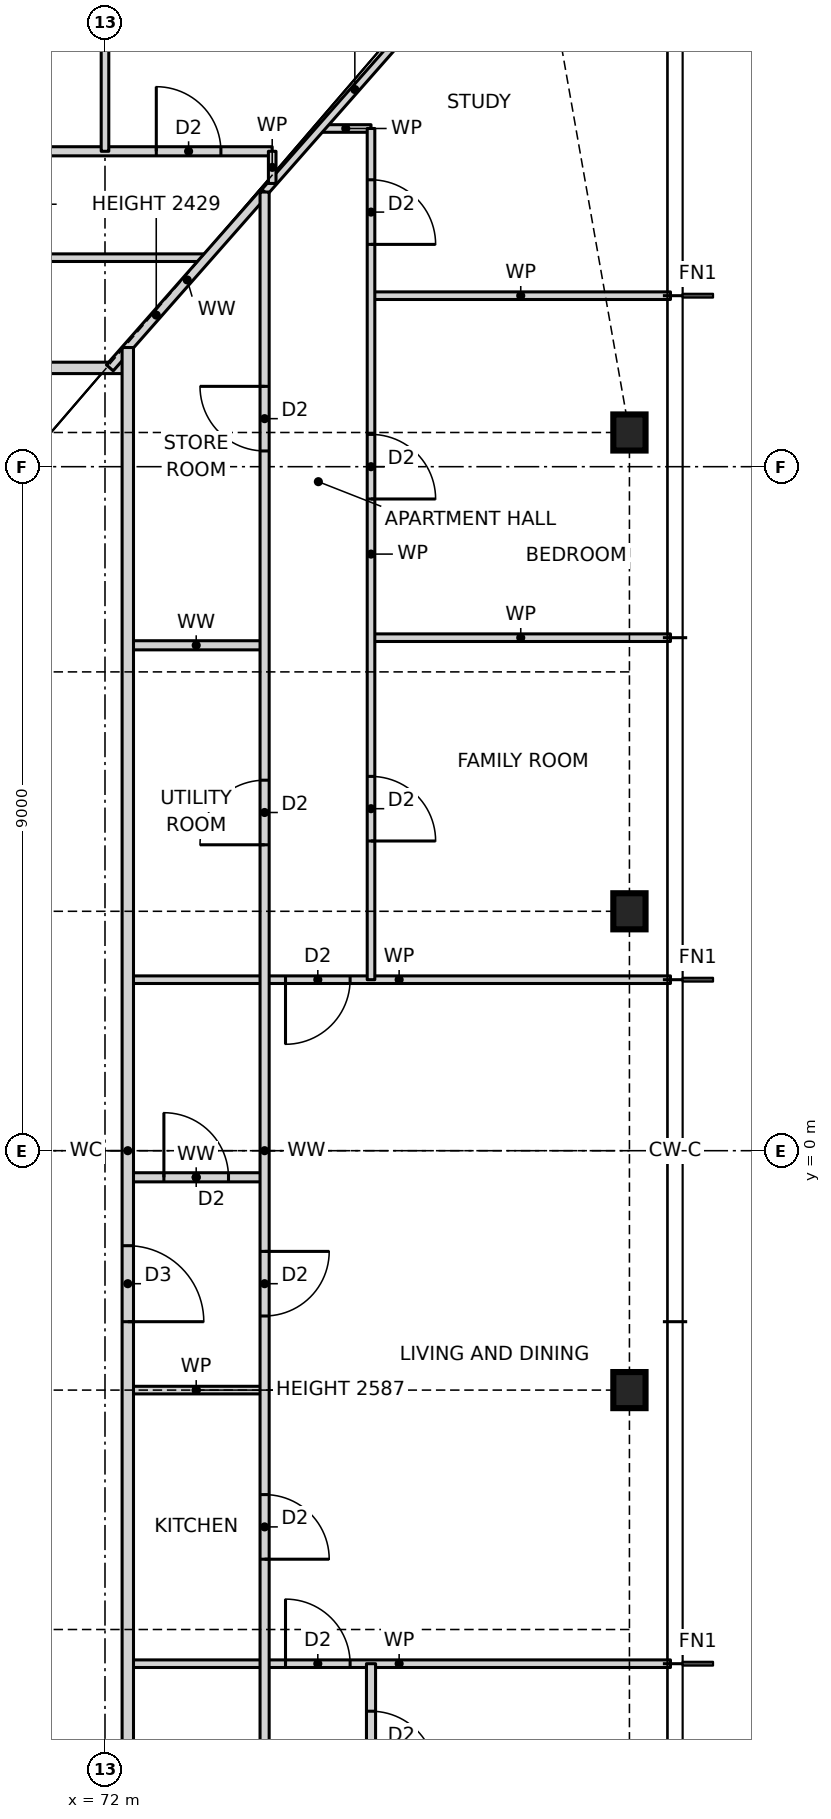
"""IFC4 building model, lengths in metres.
Left out: names, types, materials, properties, quantities, classifications, styles, units other than length and angle.
Written with IfcOpenShell. Run it as: python <this file> out.ifc"""

import sys

from ifc_helpers import new_model, si_unit, direction, frame, frame_2d, origin, origin_2d, place, context, subcontext, project, spatial, rectangle, i_section, extrude, element, fill, save


model = new_model("IFC4")
c1 = context("Model", 3, precision=1e-05, world=origin(), true_north=direction((0.0, 1.0)))
c2 = subcontext(c1, "Body", "Model", "MODEL_VIEW")
j1 = project(units=[si_unit("LENGTHUNIT", "METRE"), si_unit("PLANEANGLEUNIT", "RADIAN")], contexts=[c1])
p1 = place(None, origin())
s1 = spatial("IfcSite", under=j1, at=p1, CompositionType="ELEMENT")
p2 = place(p1, origin())
s2 = spatial("IfcBuilding", under=s1, at=p2, CompositionType="ELEMENT")
p3 = place(p2, frame((0.0, 0.0, 29.0)))
s3 = spatial("IfcBuildingStorey", under=s2, at=p3, CompositionType="ELEMENT", Elevation=29.0)
for number, where, z_axis, x_axis in (
    (1, (78.9, -3.15, 0.0), (0.0, 0.0, 1.0), (1.0, 0.0, 0.0)),
    (2, (78.9, 3.15, 0.0), (0.0, 0.0, 1.0), (1.0, 0.0, 0.0)),
    (3, (78.9, 9.45, 0.0), (0.0, 0.0, 1.0), (1.0, 0.0, 0.0)),
):
    element("IfcColumn", number, at=place(p3, frame(where, z_axis=z_axis, x_axis=x_axis)), inside=s3, PredefinedType="COLUMN", context=c2, shape_type="SweptSolid", body=[
        extrude(i_section(OverallWidth=0.424, OverallDepth=0.475, WebThickness=0.048, FlangeThickness=0.077, at=origin_2d()), origin(), (0.0, 0.0, 1.0), 3.5),
    ])
p4 = place(p3, frame((72.3, -6.75, 0.0), z_axis=(0.0, 0.0, 1.0), x_axis=(1.0, 0.0, 0.0)))
e4 = element("IfcWall", 4, at=p4, inside=s3, PredefinedType="PARTITIONING", context=c2, shape_type="SweptSolid", body=[
    extrude(rectangle(XDim=7.14, YDim=0.1, at=frame_2d((3.57, 0.0))), origin(), (0.0, 0.0, 1.0), 3.27),
])
p5 = place(p4, frame((2.075, 0.0, 0.0)))
e5 = element("IfcOpeningElement", 5, at=p5, cuts=e4, PredefinedType="OPENING", context=c2, shape_type="SweptSolid", body=[
    extrude(rectangle(XDim=0.85, YDim=2.1, at=frame_2d((0.425, 1.05))), frame((0.0, 0.06, 0.0), z_axis=(0.0, -1.0, 0.0), x_axis=(1.0, 0.0, 0.0)), (0.0, 0.0, 1.0), 0.12),
])
p6 = place(p3, frame((72.3, -3.15, 0.0), z_axis=(0.0, 0.0, 1.0), x_axis=(1.0, 0.0, 0.0)))
e6 = element("IfcWall", 6, at=p6, inside=s3, PredefinedType="PARTITIONING", context=c2, shape_type="SweptSolid", body=[
    extrude(rectangle(XDim=1.8, YDim=0.1, at=frame_2d((0.9, 0.0))), origin(), (0.0, 0.0, 1.0), 2.587),
])
p7 = place(p3, frame((72.3, -0.35, 0.0), z_axis=(0.0, 0.0, 1.0), x_axis=(1.0, 0.0, 0.0)))
e7 = element("IfcWall", 7, at=p7, inside=s3, PredefinedType="PARTITIONING", context=c2, shape_type="SweptSolid", body=[
    extrude(rectangle(XDim=1.8, YDim=0.12, at=frame_2d((0.9, 0.0))), origin(), (0.0, 0.0, 1.0), 3.27),
])
p8 = place(p7, frame((0.475, 0.0, 0.0)))
e8 = element("IfcOpeningElement", 8, at=p8, cuts=e7, PredefinedType="OPENING", context=c2, shape_type="SweptSolid", body=[
    extrude(rectangle(XDim=0.85, YDim=2.1, at=frame_2d((0.425, 1.05))), frame((0.0, 0.07, 0.0), z_axis=(0.0, -1.0, 0.0), x_axis=(1.0, 0.0, 0.0)), (0.0, 0.0, 1.0), 0.14),
])
p9 = place(p3, frame((72.3, 2.25, 0.0), z_axis=(0.0, 0.0, 1.0), x_axis=(1.0, 0.0, 0.0)))
e9 = element("IfcWall", 9, at=p9, inside=s3, PredefinedType="PARTITIONING", context=c2, shape_type="SweptSolid", body=[
    extrude(rectangle(XDim=7.14, YDim=0.1, at=frame_2d((3.57, 0.0))), origin(), (0.0, 0.0, 1.0), 3.27),
])
p10 = place(p9, frame((2.075, 0.0, 0.0)))
e10 = element("IfcOpeningElement", 10, at=p10, cuts=e9, PredefinedType="OPENING", context=c2, shape_type="SweptSolid", body=[
    extrude(rectangle(XDim=0.85, YDim=2.1, at=frame_2d((0.425, 1.05))), frame((0.0, 0.06, 0.0), z_axis=(0.0, -1.0, 0.0), x_axis=(1.0, 0.0, 0.0)), (0.0, 0.0, 1.0), 0.12),
])
p11 = place(p3, frame((72.3, 6.65, 0.0), z_axis=(0.0, 0.0, 1.0), x_axis=(1.0, 0.0, 0.0)))
e11 = element("IfcWall", 11, at=p11, inside=s3, PredefinedType="PARTITIONING", context=c2, shape_type="SweptSolid", body=[
    extrude(rectangle(XDim=1.8, YDim=0.12, at=frame_2d((0.9, 0.0))), origin(), (0.0, 0.0, 1.0), 3.27),
])
p12 = place(p3, frame((75.5, 6.75, 0.0), z_axis=(0.0, 0.0, 1.0), x_axis=(1.0, 0.0, 0.0)))
e12 = element("IfcWall", 12, at=p12, inside=s3, PredefinedType="PARTITIONING", context=c2, shape_type="SweptSolid", body=[
    extrude(rectangle(XDim=3.94, YDim=0.1, at=frame_2d((1.97, 0.0))), origin(), (0.0, 0.0, 1.0), 3.27),
])
p13 = place(p3, frame((53.7, 10.3, 0.0), z_axis=(0.0, 0.0, 1.0), x_axis=(1.0, 0.0, 0.0)))
e13 = element("IfcWall", 13, at=p13, inside=s3, PredefinedType="PARTITIONING", context=c2, shape_type="SweptSolid", body=[
    extrude(rectangle(XDim=18.6, YDim=0.15, at=frame_2d((9.3, 0.0))), origin(), (0.0, 0.0, 1.0), 3.27),
])
p14 = place(p13, frame((8.3, 0.0, 0.0)))
e14 = element("IfcOpeningElement", 14, at=p14, cuts=e13, PredefinedType="OPENING", context=c2, shape_type="SweptSolid", body=[
    extrude(rectangle(XDim=1.0, YDim=2.1, at=frame_2d((0.5, 1.05))), frame((0.0, 0.085, 0.0), z_axis=(0.0, -1.0, 0.0), x_axis=(1.0, 0.0, 0.0)), (0.0, 0.0, 1.0), 0.17),
])
p15 = place(p3, frame((75.5, 11.25, 0.0), z_axis=(0.0, 0.0, 1.0), x_axis=(1.0, 0.0, 0.0)))
e15 = element("IfcWall", 15, at=p15, inside=s3, PredefinedType="PARTITIONING", context=c2, shape_type="SweptSolid", body=[
    extrude(rectangle(XDim=3.94, YDim=0.1, at=frame_2d((1.97, 0.0))), origin(), (0.0, 0.0, 1.0), 3.27),
])
p16 = place(p3, frame((52.66, 11.75, 0.0), z_axis=(0.0, 0.0, 1.0), x_axis=(1.0, 0.0, 0.0)))
e16 = element("IfcWall", 16, at=p16, inside=s3, PredefinedType="PARTITIONING", context=c2, shape_type="SweptSolid", body=[
    extrude(rectangle(XDim=20.68, YDim=0.1, at=frame_2d((10.34, 0.0))), origin(), (0.0, 0.0, 1.0), 3.27),
])
p17 = place(p16, frame((12.615, 0.0, 0.0)))
e17 = element("IfcOpeningElement", 17, at=p17, cuts=e16, PredefinedType="OPENING", context=c2, shape_type="SweptSolid", body=[
    extrude(rectangle(XDim=0.85, YDim=2.1, at=frame_2d((0.425, 1.05))), frame((0.0, 0.06, 0.0), z_axis=(0.0, -1.0, 0.0), x_axis=(1.0, 0.0, 0.0)), (0.0, 0.0, 1.0), 0.12),
])
p18 = place(p16, frame((9.415, 0.0, 0.0)))
e18 = element("IfcOpeningElement", 18, at=p18, cuts=e16, PredefinedType="OPENING", context=c2, shape_type="SweptSolid", body=[
    extrude(rectangle(XDim=0.85, YDim=2.1, at=frame_2d((0.425, 1.05))), frame((0.0, 0.06, 0.0), z_axis=(0.0, -1.0, 0.0), x_axis=(1.0, 0.0, 0.0)), (0.0, 0.0, 1.0), 0.12),
])
p19 = place(p16, frame((17.335, 0.0, 0.0)))
e19 = element("IfcOpeningElement", 19, at=p19, cuts=e16, PredefinedType="OPENING", context=c2, shape_type="SweptSolid", body=[
    extrude(rectangle(XDim=0.85, YDim=2.1, at=frame_2d((0.425, 1.05))), frame((0.0, 0.06, 0.0), z_axis=(0.0, -1.0, 0.0), x_axis=(1.0, 0.0, 0.0)), (0.0, 0.0, 1.0), 0.12),
])
p20 = place(p16, frame((2.495, 0.0, 0.0)))
e20 = element("IfcOpeningElement", 20, at=p20, cuts=e16, PredefinedType="OPENING", context=c2, shape_type="SweptSolid", body=[
    extrude(rectangle(XDim=0.85, YDim=2.1, at=frame_2d((0.425, 1.05))), frame((0.0, 0.06, 0.0), z_axis=(0.0, -1.0, 0.0), x_axis=(1.0, 0.0, 0.0)), (0.0, 0.0, 1.0), 0.12),
])
p21 = place(p3, frame((67.5, 13.15, 0.0), z_axis=(0.0, 0.0, 1.0), x_axis=(1.0, 0.0, 0.0)))
e21 = element("IfcWall", 21, at=p21, inside=s3, PredefinedType="PARTITIONING", context=c2, shape_type="SweptSolid", body=[
    extrude(rectangle(XDim=6.7, YDim=0.12, at=frame_2d((3.35, 0.0))), origin(), (0.0, 0.0, 1.0), 3.27),
])
p22 = place(p21, frame((0.625, 0.0, 0.0)))
e22 = element("IfcOpeningElement", 22, at=p22, cuts=e21, PredefinedType="OPENING", context=c2, shape_type="SweptSolid", body=[
    extrude(rectangle(XDim=0.85, YDim=2.1, at=frame_2d((0.425, 1.05))), frame((0.0, 0.07, 0.0), z_axis=(0.0, -1.0, 0.0), x_axis=(1.0, 0.0, 0.0)), (0.0, 0.0, 1.0), 0.14),
])
p23 = place(p21, frame((5.175, 0.0, 0.0)))
e23 = element("IfcOpeningElement", 23, at=p23, cuts=e21, PredefinedType="OPENING", context=c2, shape_type="SweptSolid", body=[
    extrude(rectangle(XDim=0.85, YDim=2.1, at=frame_2d((0.425, 1.05))), frame((0.0, 0.07, 0.0), z_axis=(0.0, -1.0, 0.0), x_axis=(1.0, 0.0, 0.0)), (0.0, 0.0, 1.0), 0.14),
])
p24 = place(p3, frame((74.836, 13.45, 0.0), z_axis=(0.0, 0.0, 1.0), x_axis=(1.0, 0.0, 0.0)))
e24 = element("IfcWall", 24, at=p24, inside=s3, PredefinedType="PARTITIONING", context=c2, shape_type="SweptSolid", body=[
    extrude(rectangle(XDim=0.664, YDim=0.1, at=frame_2d((0.332, 0.0))), origin(), (0.0, 0.0, 1.0), 3.27),
])
p25 = place(p3, frame((74.1, 12.614, 0.0), z_axis=(0.0, 0.0, 1.0), x_axis=(0.660755619739, 0.750601099775, 0.0)))
e25 = element("IfcWall", 25, at=p25, inside=s3, PredefinedType="PARTITIONING", context=c2, shape_type="SweptSolid", body=[
    extrude(rectangle(XDim=5.989, YDim=0.1, at=frame_2d((2.995, 0.0))), origin(), (0.0, 0.0, 1.0), 2.429),
])
p26 = place(p3, frame((72.063, 10.301, 0.0), z_axis=(0.0, 0.0, 1.0), x_axis=(0.660761820138, 0.750595641506, 0.0)))
e26 = element("IfcWall", 26, at=p26, inside=s3, PredefinedType="PARTITIONING", context=c2, shape_type="SweptSolid", body=[
    extrude(rectangle(XDim=3.082, YDim=0.12, at=frame_2d((1.541, 0.0))), origin(), (0.0, 0.0, 1.0), 2.429),
])
p27 = place(p3, frame((75.5, -13.45, 0.0), z_axis=(0.0, 0.0, 1.0), x_axis=(0.0, 1.0, 0.0)))
e27 = element("IfcWall", 27, at=p27, inside=s3, PredefinedType="PARTITIONING", context=c2, shape_type="SweptSolid", body=[
    extrude(rectangle(XDim=6.7, YDim=0.12, at=frame_2d((3.35, 0.0))), origin(), (0.0, 0.0, 1.0), 3.27),
])
p28 = place(p27, frame((5.225, 0.0, 0.0)))
e28 = element("IfcOpeningElement", 28, at=p28, cuts=e27, PredefinedType="OPENING", context=c2, shape_type="SweptSolid", body=[
    extrude(rectangle(XDim=0.85, YDim=2.1, at=frame_2d((0.425, 1.05))), frame((0.0, 0.07, 0.0), z_axis=(0.0, -1.0, 0.0), x_axis=(1.0, 0.0, 0.0)), (0.0, 0.0, 1.0), 0.14),
])
p29 = place(p27, frame((0.675, 0.0, 0.0)))
e29 = element("IfcOpeningElement", 29, at=p29, cuts=e27, PredefinedType="OPENING", context=c2, shape_type="SweptSolid", body=[
    extrude(rectangle(XDim=0.85, YDim=2.1, at=frame_2d((0.425, 1.05))), frame((0.0, 0.07, 0.0), z_axis=(0.0, -1.0, 0.0), x_axis=(1.0, 0.0, 0.0)), (0.0, 0.0, 1.0), 0.14),
])
p30 = place(p3, frame((75.5, 2.25, 0.0), z_axis=(0.0, 0.0, 1.0), x_axis=(0.0, 1.0, 0.0)))
e30 = element("IfcWall", 30, at=p30, inside=s3, PredefinedType="PARTITIONING", context=c2, shape_type="SweptSolid", body=[
    extrude(rectangle(XDim=11.2, YDim=0.1, at=frame_2d((5.6, 0.0))), origin(), (0.0, 0.0, 1.0), 3.27),
])
p31 = place(p30, frame((1.825, 0.0, 0.0)))
e31 = element("IfcOpeningElement", 31, at=p31, cuts=e30, PredefinedType="OPENING", context=c2, shape_type="SweptSolid", body=[
    extrude(rectangle(XDim=0.85, YDim=2.1, at=frame_2d((0.425, 1.05))), frame((0.0, 0.06, 0.0), z_axis=(0.0, -1.0, 0.0), x_axis=(1.0, 0.0, 0.0)), (0.0, 0.0, 1.0), 0.12),
])
p32 = place(p30, frame((6.325, 0.0, 0.0)))
e32 = element("IfcOpeningElement", 32, at=p32, cuts=e30, PredefinedType="OPENING", context=c2, shape_type="SweptSolid", body=[
    extrude(rectangle(XDim=0.85, YDim=2.1, at=frame_2d((0.425, 1.05))), frame((0.0, 0.06, 0.0), z_axis=(0.0, -1.0, 0.0), x_axis=(1.0, 0.0, 0.0)), (0.0, 0.0, 1.0), 0.12),
])
p33 = place(p30, frame((9.675, 0.0, 0.0)))
e33 = element("IfcOpeningElement", 33, at=p33, cuts=e30, PredefinedType="OPENING", context=c2, shape_type="SweptSolid", body=[
    extrude(rectangle(XDim=0.85, YDim=2.1, at=frame_2d((0.425, 1.05))), frame((0.0, 0.06, 0.0), z_axis=(0.0, -1.0, 0.0), x_axis=(1.0, 0.0, 0.0)), (0.0, 0.0, 1.0), 0.12),
])
p34 = place(p3, frame((74.2, 12.727, 0.0), z_axis=(0.0, 0.0, 1.0), x_axis=(0.0, 1.0, 0.0)))
e34 = element("IfcWall", 34, at=p34, inside=s3, PredefinedType="PARTITIONING", context=c2, shape_type="SweptSolid", body=[
    extrude(rectangle(XDim=0.423, YDim=0.1, at=frame_2d((0.211, 0.0))), origin(), (0.0, 0.0, 1.0), 3.27),
])
p35 = place(p3, frame((74.1, -12.614, 0.0), z_axis=(0.0, 0.0, 1.0), x_axis=(0.0, 1.0, 0.0)))
e35 = element("IfcWall", 35, at=p35, inside=s3, PredefinedType="PARTITIONING", context=c2, shape_type="SweptSolid", body=[
    extrude(rectangle(XDim=25.228, YDim=0.12, at=frame_2d((12.614, 0.0))), origin(), (0.0, 0.0, 1.0), 3.27),
])
p36 = place(p35, frame((7.239, 0.0, 0.0)))
e36 = element("IfcOpeningElement", 36, at=p36, cuts=e35, PredefinedType="OPENING", context=c2, shape_type="SweptSolid", body=[
    extrude(rectangle(XDim=0.85, YDim=2.1, at=frame_2d((0.425, 1.05))), frame((0.0, 0.07, 0.0), z_axis=(0.0, -1.0, 0.0), x_axis=(1.0, 0.0, 0.0)), (0.0, 0.0, 1.0), 0.14),
])
p37 = place(p35, frame((10.439, 0.0, 0.0)))
e37 = element("IfcOpeningElement", 37, at=p37, cuts=e35, PredefinedType="OPENING", context=c2, shape_type="SweptSolid", body=[
    extrude(rectangle(XDim=0.85, YDim=2.1, at=frame_2d((0.425, 1.05))), frame((0.0, 0.07, 0.0), z_axis=(0.0, -1.0, 0.0), x_axis=(1.0, 0.0, 0.0)), (0.0, 0.0, 1.0), 0.14),
])
p38 = place(p35, frame((2.507, 0.0, 0.0)))
e38 = element("IfcOpeningElement", 38, at=p38, cuts=e35, PredefinedType="OPENING", context=c2, shape_type="SweptSolid", body=[
    extrude(rectangle(XDim=0.85, YDim=2.1, at=frame_2d((0.425, 1.05))), frame((0.0, 0.07, 0.0), z_axis=(0.0, -1.0, 0.0), x_axis=(1.0, 0.0, 0.0)), (0.0, 0.0, 1.0), 0.14),
])
p39 = place(p35, frame((16.639, 0.0, 0.0)))
e39 = element("IfcOpeningElement", 39, at=p39, cuts=e35, PredefinedType="OPENING", context=c2, shape_type="SweptSolid", body=[
    extrude(rectangle(XDim=0.85, YDim=2.1, at=frame_2d((0.425, 1.05))), frame((0.0, 0.07, 0.0), z_axis=(0.0, -1.0, 0.0), x_axis=(1.0, 0.0, 0.0)), (0.0, 0.0, 1.0), 0.14),
])
p40 = place(p35, frame((21.821, 0.0, 0.0)))
e40 = element("IfcOpeningElement", 40, at=p40, cuts=e35, PredefinedType="OPENING", context=c2, shape_type="SweptSolid", body=[
    extrude(rectangle(XDim=0.85, YDim=2.1, at=frame_2d((0.425, 1.05))), frame((0.0, 0.07, 0.0), z_axis=(0.0, -1.0, 0.0), x_axis=(1.0, 0.0, 0.0)), (0.0, 0.0, 1.0), 0.14),
])
p41 = place(p3, frame((72.3, -10.568, 0.0), z_axis=(0.0, 0.0, 1.0), x_axis=(0.0, 1.0, 0.0)))
e41 = element("IfcWall", 41, at=p41, inside=s3, PredefinedType="PARTITIONING", context=c2, shape_type="SweptSolid", body=[
    extrude(rectangle(XDim=21.136, YDim=0.15, at=frame_2d((10.568, 0.0))), origin(), (0.0, 0.0, 1.0), 3.27),
])
p42 = place(p41, frame((8.318, 0.0, 0.0)))
e42 = element("IfcOpeningElement", 42, at=p42, cuts=e41, PredefinedType="OPENING", context=c2, shape_type="SweptSolid", body=[
    extrude(rectangle(XDim=1.0, YDim=2.1, at=frame_2d((0.5, 1.05))), frame((0.0, 0.085, 0.0), z_axis=(0.0, -1.0, 0.0), x_axis=(1.0, 0.0, 0.0)), (0.0, 0.0, 1.0), 0.17),
])
p43 = place(p3, frame((72.0, 13.15, 0.0), z_axis=(0.0, 0.0, 1.0), x_axis=(0.0, 1.0, 0.0)))
e43 = element("IfcWall", 43, at=p43, inside=s3, PredefinedType="PARTITIONING", context=c2, shape_type="SweptSolid", body=[
    extrude(rectangle(XDim=5.54, YDim=0.1, at=frame_2d((2.77, 0.0))), origin(), (0.0, 0.0, 1.0), 3.27),
])
p44 = place(p36, frame((0.85, 0.0, 0.0), z_axis=(0.0, 0.0, 1.0), x_axis=(-1.0, 0.0, 0.0)))
e44 = element("IfcDoor", 44, at=p44, inside=s3, OperationType="SINGLE_SWING_RIGHT", PredefinedType="DOOR", context=c2, shape_type="SweptSolid", body=[
    extrude(rectangle(XDim=0.85, YDim=2.1, at=frame_2d((0.425, 1.05))), frame((0.0, 0.025, 0.0), z_axis=(0.0, -1.0, 0.0), x_axis=(1.0, 0.0, 0.0)), (0.0, 0.0, 1.0), 0.05),
])
fill(e36, e44)
p45 = place(p42, frame((1.0, 0.0, 0.0), z_axis=(0.0, 0.0, 1.0), x_axis=(-1.0, 0.0, 0.0)))
e45 = element("IfcDoor", 45, at=p45, inside=s3, OperationType="SINGLE_SWING_RIGHT", PredefinedType="DOOR", context=c2, shape_type="SweptSolid", body=[
    extrude(rectangle(XDim=1.0, YDim=2.1, at=frame_2d((0.5, 1.05))), frame((0.0, 0.025, 0.0), z_axis=(0.0, -1.0, 0.0), x_axis=(1.0, 0.0, 0.0)), (0.0, 0.0, 1.0), 0.05),
])
fill(e42, e45)
p46 = place(p37, frame((0.85, 0.0, 0.0), z_axis=(0.0, 0.0, 1.0), x_axis=(-1.0, 0.0, 0.0)))
e46 = element("IfcDoor", 46, at=p46, inside=s3, OperationType="SINGLE_SWING_LEFT", PredefinedType="DOOR", context=c2, shape_type="SweptSolid", body=[
    extrude(rectangle(XDim=0.85, YDim=2.1, at=frame_2d((0.425, 1.05))), frame((0.0, 0.025, 0.0), z_axis=(0.0, -1.0, 0.0), x_axis=(1.0, 0.0, 0.0)), (0.0, 0.0, 1.0), 0.05),
])
fill(e37, e46)
p47 = place(p8, origin())
e47 = element("IfcDoor", 47, at=p47, inside=s3, OperationType="SINGLE_SWING_LEFT", PredefinedType="DOOR", context=c2, shape_type="SweptSolid", body=[
    extrude(rectangle(XDim=0.85, YDim=2.1, at=frame_2d((0.425, 1.05))), frame((0.0, 0.025, 0.0), z_axis=(0.0, -1.0, 0.0), x_axis=(1.0, 0.0, 0.0)), (0.0, 0.0, 1.0), 0.05),
])
fill(e8, e47)
p48 = place(p5, origin())
e48 = element("IfcDoor", 48, at=p48, inside=s3, OperationType="SINGLE_SWING_LEFT", PredefinedType="DOOR", context=c2, shape_type="SweptSolid", body=[
    extrude(rectangle(XDim=0.85, YDim=2.1, at=frame_2d((0.425, 1.05))), frame((0.0, 0.025, 0.0), z_axis=(0.0, -1.0, 0.0), x_axis=(1.0, 0.0, 0.0)), (0.0, 0.0, 1.0), 0.05),
])
fill(e5, e48)
p49 = place(p28, frame((0.85, 0.0, 0.0), z_axis=(0.0, 0.0, 1.0), x_axis=(-1.0, 0.0, 0.0)))
e49 = element("IfcDoor", 49, at=p49, inside=s3, OperationType="SINGLE_SWING_RIGHT", PredefinedType="DOOR", context=c2, shape_type="SweptSolid", body=[
    extrude(rectangle(XDim=0.85, YDim=2.1, at=frame_2d((0.425, 1.05))), frame((0.0, 0.025, 0.0), z_axis=(0.0, -1.0, 0.0), x_axis=(1.0, 0.0, 0.0)), (0.0, 0.0, 1.0), 0.05),
])
fill(e28, e49)
p50 = place(p10, frame((0.85, 0.0, 0.0), z_axis=(0.0, 0.0, 1.0), x_axis=(-1.0, 0.0, 0.0)))
e50 = element("IfcDoor", 50, at=p50, inside=s3, OperationType="SINGLE_SWING_RIGHT", PredefinedType="DOOR", context=c2, shape_type="SweptSolid", body=[
    extrude(rectangle(XDim=0.85, YDim=2.1, at=frame_2d((0.425, 1.05))), frame((0.0, 0.025, 0.0), z_axis=(0.0, -1.0, 0.0), x_axis=(1.0, 0.0, 0.0)), (0.0, 0.0, 1.0), 0.05),
])
fill(e10, e50)
p51 = place(p31, frame((0.85, 0.0, 0.0), z_axis=(0.0, 0.0, 1.0), x_axis=(-1.0, 0.0, 0.0)))
e51 = element("IfcDoor", 51, at=p51, inside=s3, OperationType="SINGLE_SWING_RIGHT", PredefinedType="DOOR", context=c2, shape_type="SweptSolid", body=[
    extrude(rectangle(XDim=0.85, YDim=2.1, at=frame_2d((0.425, 1.05))), frame((0.0, 0.025, 0.0), z_axis=(0.0, -1.0, 0.0), x_axis=(1.0, 0.0, 0.0)), (0.0, 0.0, 1.0), 0.05),
])
fill(e31, e51)
p52 = place(p32, frame((0.85, 0.0, 0.0), z_axis=(0.0, 0.0, 1.0), x_axis=(-1.0, 0.0, 0.0)))
e52 = element("IfcDoor", 52, at=p52, inside=s3, OperationType="SINGLE_SWING_RIGHT", PredefinedType="DOOR", context=c2, shape_type="SweptSolid", body=[
    extrude(rectangle(XDim=0.85, YDim=2.1, at=frame_2d((0.425, 1.05))), frame((0.0, 0.025, 0.0), z_axis=(0.0, -1.0, 0.0), x_axis=(1.0, 0.0, 0.0)), (0.0, 0.0, 1.0), 0.05),
])
fill(e32, e52)
p53 = place(p33, frame((0.85, 0.0, 0.0), z_axis=(0.0, 0.0, 1.0), x_axis=(-1.0, 0.0, 0.0)))
e53 = element("IfcDoor", 53, at=p53, inside=s3, OperationType="SINGLE_SWING_RIGHT", PredefinedType="DOOR", context=c2, shape_type="SweptSolid", body=[
    extrude(rectangle(XDim=0.85, YDim=2.1, at=frame_2d((0.425, 1.05))), frame((0.0, 0.025, 0.0), z_axis=(0.0, -1.0, 0.0), x_axis=(1.0, 0.0, 0.0)), (0.0, 0.0, 1.0), 0.05),
])
fill(e33, e53)
p54 = place(p39, origin())
e54 = element("IfcDoor", 54, at=p54, inside=s3, OperationType="SINGLE_SWING_LEFT", PredefinedType="DOOR", context=c2, shape_type="SweptSolid", body=[
    extrude(rectangle(XDim=0.85, YDim=2.1, at=frame_2d((0.425, 1.05))), frame((0.0, 0.025, 0.0), z_axis=(0.0, -1.0, 0.0), x_axis=(1.0, 0.0, 0.0)), (0.0, 0.0, 1.0), 0.05),
])
fill(e39, e54)
p55 = place(p40, origin())
e55 = element("IfcDoor", 55, at=p55, inside=s3, OperationType="SINGLE_SWING_RIGHT", PredefinedType="DOOR", context=c2, shape_type="SweptSolid", body=[
    extrude(rectangle(XDim=0.85, YDim=2.1, at=frame_2d((0.425, 1.05))), frame((0.0, 0.025, 0.0), z_axis=(0.0, -1.0, 0.0), x_axis=(1.0, 0.0, 0.0)), (0.0, 0.0, 1.0), 0.05),
])
fill(e40, e55)
p56 = place(p23, origin())
e56 = element("IfcDoor", 56, at=p56, inside=s3, OperationType="SINGLE_SWING_LEFT", PredefinedType="DOOR", context=c2, shape_type="SweptSolid", body=[
    extrude(rectangle(XDim=0.85, YDim=2.1, at=frame_2d((0.425, 1.05))), frame((0.0, 0.025, 0.0), z_axis=(0.0, -1.0, 0.0), x_axis=(1.0, 0.0, 0.0)), (0.0, 0.0, 1.0), 0.05),
])
fill(e23, e56)
save(model, sys.argv[1])
